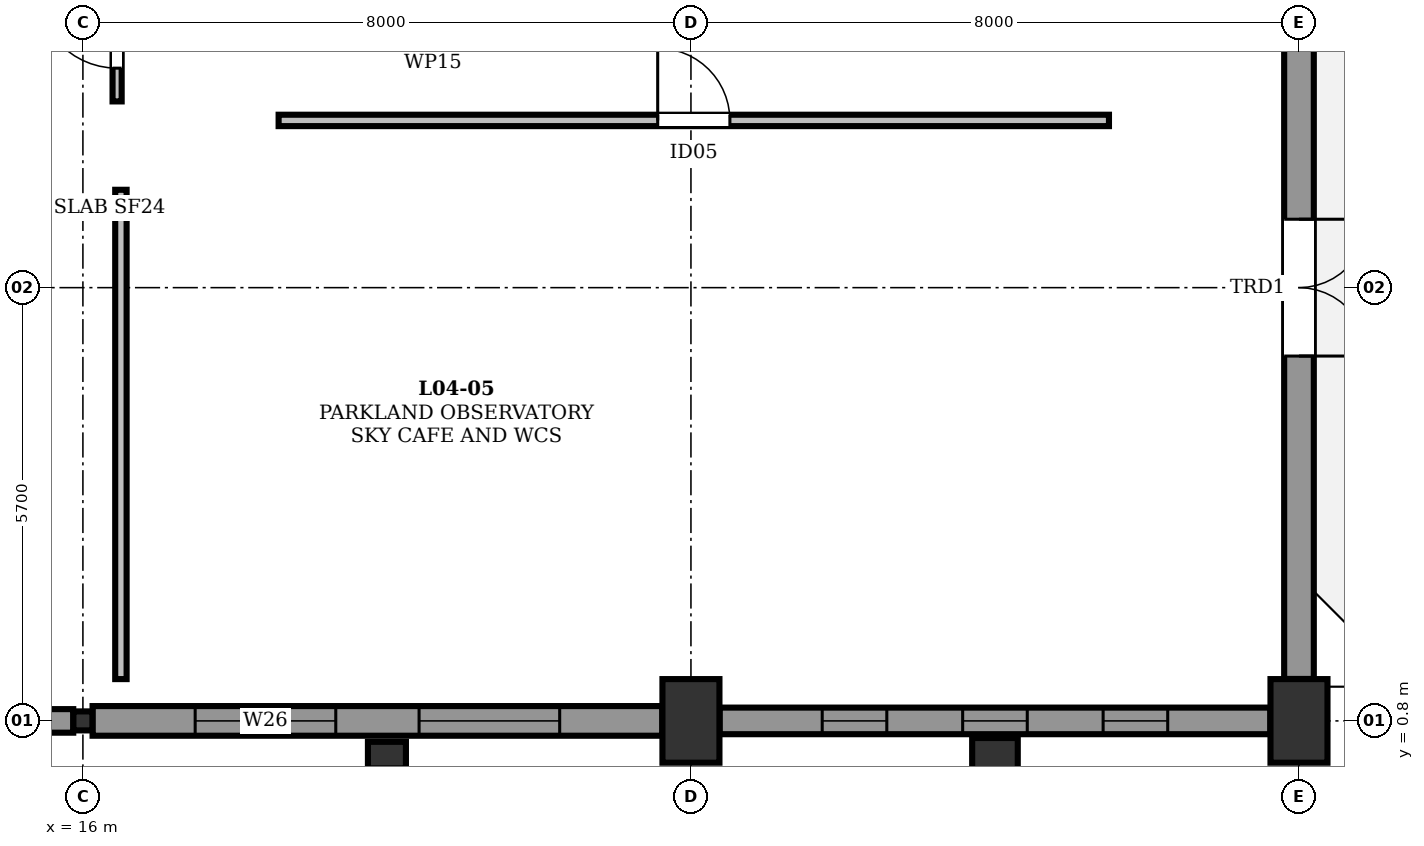
"""IFC4 building model, lengths in metres.
Left out: names, types, materials, properties, quantities, classifications, styles, units other than length and angle.
Written with IfcOpenShell. Run it as: python <this file> out.ifc"""

import sys

from ifc_helpers import new_model, si_unit, direction, frame, frame_2d, origin, origin_2d, place, context, subcontext, project, spatial, rectangle, hollow_rectangle, extrude, element, fill, save


model = new_model("IFC4")
c1 = context("Model", 3, precision=1e-05, world=origin(), true_north=direction((0.0, 1.0)))
c2 = subcontext(c1, "Body", "Model", "MODEL_VIEW")
j1 = project(units=[si_unit("LENGTHUNIT", "METRE"), si_unit("PLANEANGLEUNIT", "RADIAN")], contexts=[c1])
p1 = place(None, origin())
s1 = spatial("IfcSite", under=j1, at=p1, CompositionType="ELEMENT")
p2 = place(p1, origin())
s2 = spatial("IfcBuilding", under=s1, at=p2, CompositionType="ELEMENT")
p3 = place(p2, frame((0.0, 0.0, 19.2)))
s3 = spatial("IfcBuildingStorey", under=s2, at=p3, CompositionType="ELEMENT", Elevation=19.2)
p4 = place(p3, frame((16.0, 0.8, 0.0), z_axis=(0.0, 0.0, 1.0), x_axis=(1.0, 0.0, 0.0)))
e1 = element("IfcColumn", 1, at=p4, inside=s3, PredefinedType="COLUMN", context=c2, shape_type="SweptSolid", body=[
    extrude(hollow_rectangle(XDim=0.25, YDim=0.25, WallThickness=0.012, at=origin_2d()), origin(), (0.0, 0.0, 1.0), 4.8),
])
for number, where, z_axis, x_axis in (
    (2, (24.0, 0.8, 0.0), (0.0, 0.0, 1.0), (1.0, 0.0, 0.0)),
    (3, (32.0, 0.8, 0.0), (0.0, 0.0, 1.0), (1.0, 0.0, 0.0)),
):
    element("IfcColumn", number, at=place(p3, frame(where, z_axis=z_axis, x_axis=x_axis)), inside=s3, PredefinedType="COLUMN", context=c2, shape_type="SweptSolid", body=[
        extrude(rectangle(XDim=0.75, YDim=1.1, at=origin_2d()), origin(), (0.0, 0.0, 1.0), 4.8),
    ])
p5 = place(p3, frame((20.0, 0.35, 0.0), z_axis=(0.0, 0.0, 1.0), x_axis=(0.0, 1.0, 0.0)))
e4 = element("IfcColumn", 4, at=p5, inside=s3, PredefinedType="PILASTER", context=c2, shape_type="SweptSolid", body=[
    extrude(rectangle(XDim=0.35, YDim=0.5, at=origin_2d()), origin(), (0.0, 0.0, 1.0), 5.65),
])
p6 = place(p3, frame((28.0, 0.35, 0.0), z_axis=(0.0, 0.0, 1.0), x_axis=(0.0, 1.0, 0.0)))
e5 = element("IfcColumn", 5, at=p6, inside=s3, PredefinedType="PILASTER", context=c2, shape_type="SweptSolid", body=[
    extrude(rectangle(XDim=0.45, YDim=0.6, at=origin_2d()), origin(), (0.0, 0.0, 1.0), 5.65),
])
p7 = place(p3, frame((8.377, 0.8, 0.0), z_axis=(0.0, 0.0, 1.0), x_axis=(1.0, 0.0, 0.0)))
e6 = element("IfcWall", 6, at=p7, inside=s3, PredefinedType="STANDARD", context=c2, shape_type="SweptSolid", body=[
    extrude(rectangle(XDim=7.496, YDim=0.31, at=frame_2d((3.748, 0.0))), origin(), (0.0, 0.0, 1.0), 3.845),
])
p8 = place(p7, frame((2.473, 0.0, 0.75)))
e7 = element("IfcOpeningElement", 7, at=p8, cuts=e6, PredefinedType="OPENING", context=c2, shape_type="SweptSolid", body=[
    extrude(rectangle(XDim=2.55, YDim=1.55, at=frame_2d((1.275, 0.775))), frame((0.0, 0.167, 0.0), z_axis=(0.0, -1.0, 0.0), x_axis=(1.0, 0.0, 0.0)), (0.0, 0.0, 1.0), 0.334),
])
p9 = place(p3, frame((16.127, 0.8, 0.0), z_axis=(0.0, 0.0, 1.0), x_axis=(1.0, 0.0, 0.0)))
e8 = element("IfcWall", 8, at=p9, inside=s3, PredefinedType="STANDARD", context=c2, shape_type="SweptSolid", body=[
    extrude(rectangle(XDim=7.496, YDim=0.39, at=frame_2d((3.748, 0.0))), origin(), (0.0, 0.0, 1.0), 3.845),
])
p10 = place(p9, frame((1.35, 0.0, 0.75)))
e9 = element("IfcOpeningElement", 9, at=p10, cuts=e8, PredefinedType="OPENING", context=c2, shape_type="SweptSolid", body=[
    extrude(rectangle(XDim=1.85, YDim=2.5, at=frame_2d((0.925, 1.25))), frame((0.0, 0.207, 0.0), z_axis=(0.0, -1.0, 0.0), x_axis=(1.0, 0.0, 0.0)), (0.0, 0.0, 1.0), 0.414),
])
p11 = place(p9, frame((4.296, 0.0, 0.75)))
e10 = element("IfcOpeningElement", 10, at=p11, cuts=e8, PredefinedType="OPENING", context=c2, shape_type="SweptSolid", body=[
    extrude(rectangle(XDim=1.85, YDim=2.5, at=frame_2d((0.925, 1.25))), frame((0.0, 0.207, 0.0), z_axis=(0.0, -1.0, 0.0), x_axis=(1.0, 0.0, 0.0)), (0.0, 0.0, 1.0), 0.414),
])
p12 = place(p3, frame((24.377, 0.8, 0.0), z_axis=(0.0, 0.0, 1.0), x_axis=(1.0, 0.0, 0.0)))
e11 = element("IfcWall", 11, at=p12, inside=s3, PredefinedType="STANDARD", context=c2, shape_type="SweptSolid", body=[
    extrude(rectangle(XDim=7.246, YDim=0.35, at=frame_2d((3.623, 0.0))), origin(), (0.0, 0.0, 1.0), 3.845),
])
p13 = place(p12, frame((1.35, 0.0, 0.75)))
e12 = element("IfcOpeningElement", 12, at=p13, cuts=e11, PredefinedType="OPENING", context=c2, shape_type="SweptSolid", body=[
    extrude(rectangle(XDim=0.85, YDim=1.75, at=frame_2d((0.425, 0.875))), frame((0.0, 0.187, 0.0), z_axis=(0.0, -1.0, 0.0), x_axis=(1.0, 0.0, 0.0)), (0.0, 0.0, 1.0), 0.374),
])
p14 = place(p12, frame((3.198, 0.0, 0.75)))
e13 = element("IfcOpeningElement", 13, at=p14, cuts=e11, PredefinedType="OPENING", context=c2, shape_type="SweptSolid", body=[
    extrude(rectangle(XDim=0.85, YDim=1.75, at=frame_2d((0.425, 0.875))), frame((0.0, 0.187, 0.0), z_axis=(0.0, -1.0, 0.0), x_axis=(1.0, 0.0, 0.0)), (0.0, 0.0, 1.0), 0.374),
])
p15 = place(p12, frame((5.046, 0.0, 0.75)))
e14 = element("IfcOpeningElement", 14, at=p15, cuts=e11, PredefinedType="OPENING", context=c2, shape_type="SweptSolid", body=[
    extrude(rectangle(XDim=0.85, YDim=1.75, at=frame_2d((0.425, 0.875))), frame((0.0, 0.187, 0.0), z_axis=(0.0, -1.0, 0.0), x_axis=(1.0, 0.0, 0.0)), (0.0, 0.0, 1.0), 0.374),
])
p16 = place(p3, frame((32.0, 1.352, 0.0), z_axis=(0.0, 0.0, 1.0), x_axis=(0.0, 1.0, 0.0)))
e15 = element("IfcWall", 15, at=p16, inside=s3, PredefinedType="STANDARD", context=c2, shape_type="SweptSolid", body=[
    extrude(rectangle(XDim=10.296, YDim=0.39, at=frame_2d((5.148, 0.0))), origin(), (0.0, 0.0, 1.0), 3.845),
])
p17 = place(p16, frame((4.248, 0.0, 0.0)))
e16 = element("IfcOpeningElement", 16, at=p17, cuts=e15, PredefinedType="OPENING", context=c2, shape_type="SweptSolid", body=[
    extrude(rectangle(XDim=1.8, YDim=2.3, at=frame_2d((0.9, 1.15))), frame((0.0, 0.207, 0.0), z_axis=(0.0, -1.0, 0.0), x_axis=(1.0, 0.0, 0.0)), (0.0, 0.0, 1.0), 0.414),
])
p18 = place(p3, frame((16.45, 8.95, 0.0), z_axis=(0.0, 0.0, 1.0), x_axis=(0.0, 1.0, 0.0)))
e17 = element("IfcWall", 17, at=p18, inside=s3, PredefinedType="PARTITIONING", context=c2, shape_type="SweptSolid", body=[
    extrude(rectangle(XDim=2.75, YDim=0.12, at=frame_2d((1.375, 0.0))), origin(), (0.0, 0.0, 1.0), 3.845),
])
p19 = place(p18, frame((0.438, 0.0, 0.0)))
e18 = element("IfcOpeningElement", 18, at=p19, cuts=e17, PredefinedType="OPENING", context=c2, shape_type="SweptSolid", body=[
    extrude(rectangle(XDim=1.05, YDim=2.15, at=frame_2d((0.525, 1.075))), frame((0.0, 0.072, 0.0), z_axis=(0.0, -1.0, 0.0), x_axis=(1.0, 0.0, 0.0)), (0.0, 0.0, 1.0), 0.144),
])
p20 = place(p3, frame((18.575, 8.7, 0.0), z_axis=(0.0, 0.0, 1.0), x_axis=(1.0, 0.0, 0.0)))
e19 = element("IfcWall", 19, at=p20, inside=s3, PredefinedType="PARTITIONING", context=c2, shape_type="SweptSolid", body=[
    extrude(rectangle(XDim=10.925, YDim=0.15, at=frame_2d((5.462, 0.0))), origin(), (0.0, 0.0, 1.0), 3.845),
])
p21 = place(p20, frame((4.988, 0.0, 0.0)))
e20 = element("IfcOpeningElement", 20, at=p21, cuts=e19, PredefinedType="OPENING", context=c2, shape_type="SweptSolid", body=[
    extrude(rectangle(XDim=0.95, YDim=2.15, at=frame_2d((0.475, 1.075))), frame((0.0, 0.087, 0.0), z_axis=(0.0, -1.0, 0.0), x_axis=(1.0, 0.0, 0.0)), (0.0, 0.0, 1.0), 0.174),
])
p22 = place(p3, frame((16.5, 1.35, 0.0), z_axis=(0.0, 0.0, 1.0), x_axis=(0.0, 1.0, 0.0)))
e21 = element("IfcWall", 21, at=p22, inside=s3, PredefinedType="PARTITIONING", context=c2, shape_type="SweptSolid", body=[
    extrude(rectangle(XDim=6.438, YDim=0.15, at=frame_2d((3.219, 0.0))), origin(), (0.0, 0.0, 1.0), 4.56),
])
p23 = place(p10, origin())
e22 = element("IfcWindow", 22, at=p23, inside=s3, PartitioningType="DOUBLE_PANEL_VERTICAL", PredefinedType="WINDOW", context=c2, shape_type="SweptSolid", body=[
    extrude(rectangle(XDim=1.85, YDim=2.5, at=frame_2d((0.925, 1.25))), frame((0.0, 0.08, 0.0), z_axis=(0.0, -1.0, 0.0), x_axis=(1.0, 0.0, 0.0)), (0.0, 0.0, 1.0), 0.06),
])
fill(e9, e22)
p24 = place(p11, origin())
e23 = element("IfcWindow", 23, at=p24, inside=s3, PartitioningType="DOUBLE_PANEL_VERTICAL", PredefinedType="WINDOW", context=c2, shape_type="SweptSolid", body=[
    extrude(rectangle(XDim=1.85, YDim=2.5, at=frame_2d((0.925, 1.25))), frame((0.0, 0.08, 0.0), z_axis=(0.0, -1.0, 0.0), x_axis=(1.0, 0.0, 0.0)), (0.0, 0.0, 1.0), 0.06),
])
fill(e10, e23)
p25 = place(p13, origin())
e24 = element("IfcWindow", 24, at=p25, inside=s3, PartitioningType="SINGLE_PANEL", PredefinedType="WINDOW", context=c2, shape_type="SweptSolid", body=[
    extrude(rectangle(XDim=0.85, YDim=1.75, at=frame_2d((0.425, 0.875))), frame((0.0, 0.08, 0.0), z_axis=(0.0, -1.0, 0.0), x_axis=(1.0, 0.0, 0.0)), (0.0, 0.0, 1.0), 0.06),
])
fill(e12, e24)
p26 = place(p14, origin())
e25 = element("IfcWindow", 25, at=p26, inside=s3, PartitioningType="SINGLE_PANEL", PredefinedType="WINDOW", context=c2, shape_type="SweptSolid", body=[
    extrude(rectangle(XDim=0.85, YDim=1.75, at=frame_2d((0.425, 0.875))), frame((0.0, 0.08, 0.0), z_axis=(0.0, -1.0, 0.0), x_axis=(1.0, 0.0, 0.0)), (0.0, 0.0, 1.0), 0.06),
])
fill(e13, e25)
p27 = place(p15, origin())
e26 = element("IfcWindow", 26, at=p27, inside=s3, PartitioningType="SINGLE_PANEL", PredefinedType="WINDOW", context=c2, shape_type="SweptSolid", body=[
    extrude(rectangle(XDim=0.85, YDim=1.75, at=frame_2d((0.425, 0.875))), frame((0.0, 0.08, 0.0), z_axis=(0.0, -1.0, 0.0), x_axis=(1.0, 0.0, 0.0)), (0.0, 0.0, 1.0), 0.06),
])
fill(e14, e26)
p28 = place(p17, frame((1.8, 0.0, 0.0), z_axis=(0.0, 0.0, 1.0), x_axis=(-1.0, 0.0, 0.0)))
e27 = element("IfcDoor", 27, at=p28, inside=s3, OperationType="DOUBLE_DOOR_SINGLE_SWING", PredefinedType="DOOR", context=c2, shape_type="SweptSolid", body=[
    extrude(rectangle(XDim=1.8, YDim=2.3, at=frame_2d((0.9, 1.15))), frame((0.0, 0.025, 0.0), z_axis=(0.0, -1.0, 0.0), x_axis=(1.0, 0.0, 0.0)), (0.0, 0.0, 1.0), 0.05),
])
fill(e16, e27)
p29 = place(p19, origin())
e28 = element("IfcDoor", 28, at=p29, inside=s3, OperationType="SINGLE_SWING_RIGHT", PredefinedType="DOOR", context=c2, shape_type="SweptSolid", body=[
    extrude(rectangle(XDim=1.05, YDim=2.15, at=frame_2d((0.525, 1.075))), frame((0.0, 0.025, 0.0), z_axis=(0.0, -1.0, 0.0), x_axis=(1.0, 0.0, 0.0)), (0.0, 0.0, 1.0), 0.05),
])
fill(e18, e28)
p30 = place(p21, origin())
e29 = element("IfcDoor", 29, at=p30, inside=s3, OperationType="SINGLE_SWING_LEFT", PredefinedType="DOOR", context=c2, shape_type="SweptSolid", body=[
    extrude(rectangle(XDim=0.95, YDim=2.15, at=frame_2d((0.475, 1.075))), frame((0.0, 0.025, 0.0), z_axis=(0.0, -1.0, 0.0), x_axis=(1.0, 0.0, 0.0)), (0.0, 0.0, 1.0), 0.05),
])
fill(e20, e29)
save(model, sys.argv[1])
